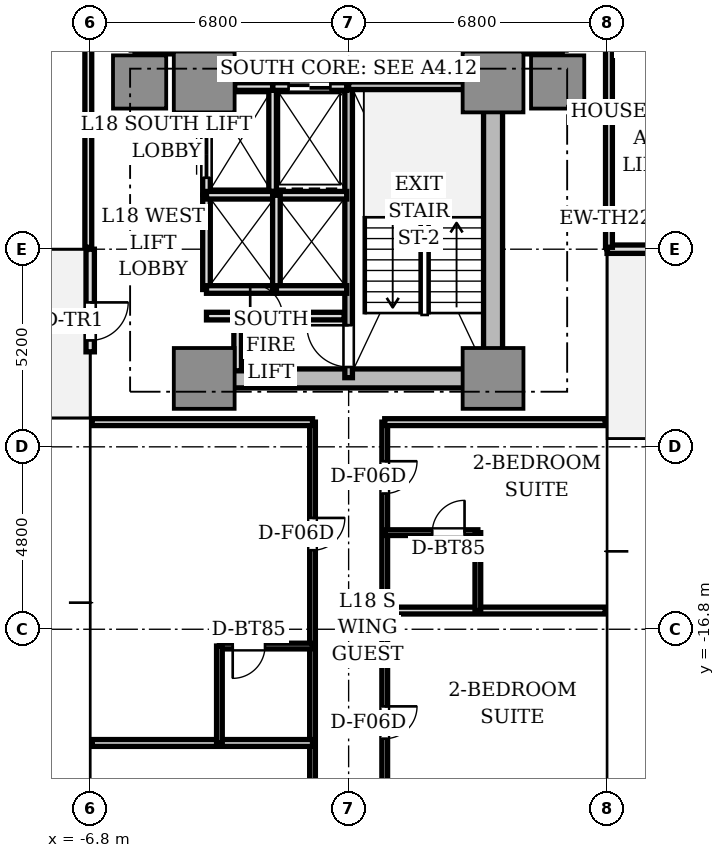
"""IFC4 building model, lengths in metres.
Left out: names, types, materials, properties, quantities, classifications, styles, units other than length and angle.
Written with IfcOpenShell. Run it as: python <this file> out.ifc"""

import sys

from ifc_helpers import new_model, si_unit, direction, frame, frame_2d, origin, origin_2d, place, context, subcontext, project, spatial, rectangle, extrude, source, transform, mapped, element, fill, save


model = new_model("IFC4")
c1 = context("Model", 3, precision=1e-05, world=origin(), true_north=direction((0.0, 1.0)))
c2 = subcontext(c1, "Body", "Model", "MODEL_VIEW")
j1 = project(units=[si_unit("LENGTHUNIT", "METRE"), si_unit("PLANEANGLEUNIT", "RADIAN")], contexts=[c1])
p1 = place(None, origin())
s1 = spatial("IfcSite", under=j1, at=p1, CompositionType="ELEMENT")
p2 = place(p1, origin())
s2 = spatial("IfcBuilding", under=s1, at=p2, CompositionType="ELEMENT")
p3 = place(p2, frame((0.0, 0.0, 67.8)))
s3 = spatial("IfcBuildingStorey", under=s2, at=p3, CompositionType="ELEMENT", Elevation=67.8)
p4 = place(p3, frame((-3.55, -10.2, 0.0), z_axis=(0.0, 0.0, 1.0), x_axis=(1.0, 0.0, 0.0)))
e1 = element("IfcWall", 1, at=p4, inside=s3, PredefinedType="SHEAR", context=c2, shape_type="SweptSolid", body=[
    extrude(rectangle(XDim=7.1, YDim=0.5, at=frame_2d((3.55, 0.0))), origin(), (0.0, 0.0, 1.0), 3.11),
])
p5 = place(p3, frame((3.8, -9.75, 0.0), z_axis=(0.0, 0.0, 1.0), x_axis=(0.0, 1.0, 0.0)))
e2 = element("IfcWall", 2, at=p5, inside=s3, PredefinedType="SHEAR", context=c2, shape_type="SweptSolid", body=[
    extrude(rectangle(XDim=6.9, YDim=0.5, at=frame_2d((3.45, 0.0))), origin(), (0.0, 0.0, 1.0), 3.11),
])
m1 = source(origin(), c2, "Body", "SweptSolid", [
    extrude(rectangle(XDim=1.6, YDim=1.6, at=origin_2d()), origin(), (0.0, 0.0, 1.0), 3.11),
])
for number, where, z_axis, x_axis in (
    (3, (-3.8, -2.4, 0.0), (0.0, 0.0, 1.0), (1.0, 0.0, 0.0)),
    (4, (3.8, -2.4, 0.0), (0.0, 0.0, 1.0), (1.0, 0.0, 0.0)),
    (5, (-3.8, -10.2, 0.0), (0.0, 0.0, 1.0), (1.0, 0.0, 0.0)),
    (6, (3.8, -10.2, 0.0), (0.0, 0.0, 1.0), (1.0, 0.0, 0.0)),
):
    element("IfcColumn", number, at=place(p3, frame(where, z_axis=z_axis, x_axis=x_axis)), inside=s3, PredefinedType="COLUMN", context=c2, shape_type="MappedRepresentation", body=[
        mapped(m1, transform((0.0, 0.0, 0.0), scale=1.0)),
    ])
m2 = source(origin(), c2, "Body", "SweptSolid", [
    extrude(rectangle(XDim=1.4, YDim=1.4, at=origin_2d()), origin(), (0.0, 0.0, 1.0), 3.11),
])
for number, where, z_axis, x_axis in (
    (7, (5.5, -2.4, 0.0), (0.0, 0.0, 1.0), (1.0, 0.0, 0.0)),
    (8, (-5.5, -2.4, 0.0), (0.0, 0.0, 1.0), (1.0, 0.0, 0.0)),
):
    element("IfcColumn", number, at=place(p3, frame(where, z_axis=z_axis, x_axis=x_axis)), inside=s3, PredefinedType="COLUMN", context=c2, shape_type="MappedRepresentation", body=[
        mapped(m2, transform((0.0, 0.0, 0.0), scale=1.0)),
    ])
p6 = place(p3, frame((6.8, -6.8, 0.0), z_axis=(0.0, 0.0, 1.0), x_axis=(1.0, 0.0, 0.0)))
e9 = element("IfcWall", 9, at=p6, inside=s3, PredefinedType="STANDARD", context=c2, shape_type="SweptSolid", body=[
    extrude(rectangle(XDim=2.7, YDim=0.22, at=frame_2d((1.35, 0.0))), origin(), (0.0, 0.0, 1.0), 3.11),
])
p7 = place(p6, frame((1.4, 0.0, 0.0)))
e10 = element("IfcOpeningElement", 10, at=p7, cuts=e9, PredefinedType="OPENING", context=c2, shape_type="SweptSolid", body=[
    extrude(rectangle(XDim=1.0, YDim=2.2, at=frame_2d((0.5, 1.1))), frame((0.0, 0.12, 0.0), z_axis=(0.0, -1.0, 0.0), x_axis=(1.0, 0.0, 0.0)), (0.0, 0.0, 1.0), 0.24),
])
p8 = place(p3, frame((-6.8, -6.8, 0.0), z_axis=(0.0, 0.0, 1.0), x_axis=(0.0, -1.0, 0.0)))
e11 = element("IfcWall", 11, at=p8, inside=s3, PredefinedType="STANDARD", context=c2, shape_type="SweptSolid", body=[
    extrude(rectangle(XDim=2.7, YDim=0.22, at=frame_2d((1.35, 0.0))), origin(), (0.0, 0.0, 1.0), 3.11),
])
p9 = place(p8, frame((1.4, 0.0, 0.0)))
e12 = element("IfcOpeningElement", 12, at=p9, cuts=e11, PredefinedType="OPENING", context=c2, shape_type="SweptSolid", body=[
    extrude(rectangle(XDim=1.0, YDim=2.2, at=frame_2d((0.5, 1.1))), frame((0.0, 0.12, 0.0), z_axis=(0.0, -1.0, 0.0), x_axis=(1.0, 0.0, 0.0)), (0.0, 0.0, 1.0), 0.24),
])
p10 = place(p3, frame((0.0, -10.18, 0.0), z_axis=(0.0, 0.0, 1.0), x_axis=(0.0, 1.0, 0.0)))
e13 = element("IfcWall", 13, at=p10, inside=s3, PredefinedType="SOLIDWALL", context=c2, shape_type="SweptSolid", body=[
    extrude(rectangle(XDim=7.68, YDim=0.2, at=frame_2d((3.84, 0.0))), origin(), (0.0, 0.0, 1.0), 3.11),
])
p11 = place(p10, frame((0.28, 0.0, 0.0)))
e14 = element("IfcOpeningElement", 14, at=p11, cuts=e13, PredefinedType="OPENING", context=c2, shape_type="SweptSolid", body=[
    extrude(rectangle(XDim=1.1, YDim=2.15, at=frame_2d((0.55, 1.075))), frame((0.0, 0.11, 0.0), z_axis=(0.0, -1.0, 0.0), x_axis=(1.0, 0.0, 0.0)), (0.0, 0.0, 1.0), 0.22),
])
p12 = place(p3, frame((0.0, -2.5, 0.0), z_axis=(0.0, 0.0, 1.0), x_axis=(1.0, 0.0, 0.0)))
e15 = element("IfcWall", 15, at=p12, inside=s3, PredefinedType="SOLIDWALL", context=c2, shape_type="SweptSolid", body=[
    extrude(rectangle(XDim=3.72, YDim=0.2, at=frame_2d((1.86, 0.0))), origin(), (0.0, 0.0, 1.0), 3.11),
])
p13 = place(p3, frame((-2.0, -5.28, 0.0), z_axis=(0.0, 0.0, 1.0), x_axis=(0.0, 1.0, 0.0)))
e16 = element("IfcWall", 16, at=p13, inside=s3, PredefinedType="SOLIDWALL", context=c2, shape_type="SweptSolid", body=[
    extrude(rectangle(XDim=2.78, YDim=0.2, at=frame_2d((1.39, 0.0))), origin(), (0.0, 0.0, 1.0), 2.66),
])
p14 = place(p3, frame((-2.0, -2.52, 0.0), z_axis=(0.0, 0.0, 1.0), x_axis=(1.0, 0.0, 0.0)))
e17 = element("IfcWall", 17, at=p14, inside=s3, PredefinedType="SOLIDWALL", context=c2, shape_type="SweptSolid", body=[
    extrude(rectangle(XDim=1.95, YDim=0.2, at=frame_2d((0.975, 0.0))), origin(), (0.0, 0.0, 1.0), 2.66),
])
p15 = place(p14, frame((0.42, 0.0, 0.0)))
e18 = element("IfcOpeningElement", 18, at=p15, cuts=e17, PredefinedType="OPENING", context=c2, shape_type="SweptSolid", body=[
    extrude(rectangle(XDim=1.1, YDim=2.2, at=frame_2d((0.55, 1.1))), frame((0.0, 0.11, 0.0), z_axis=(0.0, -1.0, 0.0), x_axis=(1.0, 0.0, 0.0)), (0.0, 0.0, 1.0), 0.22),
])
p16 = place(p3, frame((-3.0, -2.52, 0.0), z_axis=(0.0, 0.0, 1.0), x_axis=(1.0, 0.0, 0.0)))
e19 = element("IfcWall", 19, at=p16, inside=s3, PredefinedType="SOLIDWALL", context=c2, shape_type="SweptSolid", body=[
    extrude(rectangle(XDim=1.0, YDim=0.2, at=frame_2d((0.5, 0.0))), origin(), (0.0, 0.0, 1.0), 2.66),
])
p17 = place(p3, frame((-3.74, -5.36, 0.0), z_axis=(0.0, 0.0, 1.0), x_axis=(0.0, 1.0, 0.0)))
e20 = element("IfcWall", 20, at=p17, inside=s3, PredefinedType="SOLIDWALL", context=c2, shape_type="SweptSolid", body=[
    extrude(rectangle(XDim=2.08, YDim=0.2, at=frame_2d((1.04, 0.0))), origin(), (0.0, 0.0, 1.0), 2.66),
])
p18 = place(p17, frame((0.44, 0.0, 0.0)))
e21 = element("IfcOpeningElement", 21, at=p18, cuts=e20, PredefinedType="OPENING", context=c2, shape_type="SweptSolid", body=[
    extrude(rectangle(XDim=1.2, YDim=2.2, at=frame_2d((0.6, 1.1))), frame((0.0, 0.11, 0.0), z_axis=(0.0, -1.0, 0.0), x_axis=(1.0, 0.0, 0.0)), (0.0, 0.0, 1.0), 0.22),
])
p19 = place(p3, frame((-3.74, -7.86, 0.0), z_axis=(0.0, 0.0, 1.0), x_axis=(0.0, 1.0, 0.0)))
e22 = element("IfcWall", 22, at=p19, inside=s3, PredefinedType="SOLIDWALL", context=c2, shape_type="SweptSolid", body=[
    extrude(rectangle(XDim=2.48, YDim=0.2, at=frame_2d((1.24, 0.0))), origin(), (0.0, 0.0, 1.0), 2.66),
])
p20 = place(p3, frame((-3.74, -7.86, 0.0), z_axis=(0.0, 0.0, 1.0), x_axis=(1.0, 0.0, 0.0)))
e23 = element("IfcWall", 23, at=p20, inside=s3, PredefinedType="SOLIDWALL", context=c2, shape_type="SweptSolid", body=[
    extrude(rectangle(XDim=1.84, YDim=0.2, at=frame_2d((0.92, 0.0))), origin(), (0.0, 0.0, 1.0), 2.66),
])
p21 = place(p3, frame((-3.74, -5.38, 0.0), z_axis=(0.0, 0.0, 1.0), x_axis=(1.0, 0.0, 0.0)))
e24 = element("IfcWall", 24, at=p21, inside=s3, PredefinedType="SOLIDWALL", context=c2, shape_type="SweptSolid", body=[
    extrude(rectangle(XDim=3.69, YDim=0.2, at=frame_2d((1.845, 0.0))), origin(), (0.0, 0.0, 1.0), 2.66),
])
p22 = place(p3, frame((-1.9, -7.86, 0.0), z_axis=(0.0, 0.0, 1.0), x_axis=(0.0, 1.0, 0.0)))
e25 = element("IfcWall", 25, at=p22, inside=s3, PredefinedType="SOLIDWALL", context=c2, shape_type="SweptSolid", body=[
    extrude(rectangle(XDim=2.48, YDim=0.2, at=frame_2d((1.24, 0.0))), origin(), (0.0, 0.0, 1.0), 2.66),
])
p23 = place(p3, frame((-1.9, -7.86, 0.0), z_axis=(0.0, 0.0, 1.0), x_axis=(1.0, 0.0, 0.0)))
e26 = element("IfcWall", 26, at=p23, inside=s3, PredefinedType="SOLIDWALL", context=c2, shape_type="SweptSolid", body=[
    extrude(rectangle(XDim=1.85, YDim=0.2, at=frame_2d((0.925, 0.0))), origin(), (0.0, 0.0, 1.0), 2.66),
])
for number, where, z_axis, x_axis in (
    (27, (3.98, -1.56, 0.0), (0.0, 0.0, 1.0), (1.0, 0.0, 0.0)),
    (28, (-5.62, -1.56, 0.0), (0.0, 0.0, 1.0), (1.0, 0.0, 0.0)),
):
    element("IfcWall", number, at=place(p3, frame(where, z_axis=z_axis, x_axis=x_axis)), inside=s3, PredefinedType="SOLIDWALL", context=c2, shape_type="SweptSolid", body=[
        extrude(rectangle(XDim=1.64, YDim=0.2, at=frame_2d((0.82, 0.0))), origin(), (0.0, 0.0, 1.0), 2.66),
    ])
p24 = place(p3, frame((-3.74, -8.56, 0.0), z_axis=(0.0, 0.0, 1.0), x_axis=(1.0, 0.0, 0.0)))
e29 = element("IfcWall", 29, at=p24, inside=s3, PredefinedType="SOLIDWALL", context=c2, shape_type="SweptSolid", body=[
    extrude(rectangle(XDim=3.62, YDim=0.2, at=frame_2d((1.81, 0.0))), origin(), (0.0, 0.0, 1.0), 2.66),
])
p25 = place(p24, frame((1.15, 0.0, 0.0)))
e30 = element("IfcOpeningElement", 30, at=p25, cuts=e29, PredefinedType="OPENING", context=c2, shape_type="SweptSolid", body=[
    extrude(rectangle(XDim=0.85, YDim=2.1, at=frame_2d((0.425, 1.05))), frame((0.0, 0.11, 0.0), z_axis=(0.0, -1.0, 0.0), x_axis=(1.0, 0.0, 0.0)), (0.0, 0.0, 1.0), 0.22),
])
p26 = place(p3, frame((-2.92, -10.0, 0.0), z_axis=(0.0, 0.0, 1.0), x_axis=(0.0, 1.0, 0.0)))
e31 = element("IfcWall", 31, at=p26, inside=s3, PredefinedType="SOLIDWALL", context=c2, shape_type="SweptSolid", body=[
    extrude(rectangle(XDim=1.44, YDim=0.2, at=frame_2d((0.72, 0.0))), origin(), (0.0, 0.0, 1.0), 2.66),
])
p27 = place(p3, frame((6.85, -6.75, 0.0), z_axis=(0.0, 0.0, 1.0), x_axis=(0.0, 1.0, 0.0)))
e32 = element("IfcWall", 32, at=p27, inside=s3, PredefinedType="PARTITIONING", context=c2, shape_type="SweptSolid", body=[
    extrude(rectangle(XDim=5.75, YDim=0.18, at=frame_2d((2.875, 0.0))), origin(), (0.0, 0.0, 1.0), 2.66),
])
p28 = place(p3, frame((-6.85, -0.95, 0.0), z_axis=(0.0, 0.0, 1.0), x_axis=(0.0, -1.0, 0.0)))
e33 = element("IfcWall", 33, at=p28, inside=s3, PredefinedType="PARTITIONING", context=c2, shape_type="SweptSolid", body=[
    extrude(rectangle(XDim=5.8, YDim=0.18, at=frame_2d((2.9, 0.0))), origin(), (0.0, 0.0, 1.0), 2.66),
])
p29 = place(p3, frame((0.95, -11.35, 0.0), z_axis=(0.0, 0.0, 1.0), x_axis=(0.0, -1.0, 0.0)))
e34 = element("IfcWall", 34, at=p29, inside=s3, PredefinedType="PARTITIONING", context=c2, shape_type="SweptSolid", body=[
    extrude(rectangle(XDim=13.4, YDim=0.15, at=frame_2d((6.7, 0.0))), origin(), (0.0, 0.0, 1.0), 2.66),
])
p30 = place(p29, frame((1.029, 0.0, 0.0)))
e35 = element("IfcOpeningElement", 35, at=p30, cuts=e34, PredefinedType="OPENING", context=c2, shape_type="SweptSolid", body=[
    extrude(rectangle(XDim=0.85, YDim=2.1, at=frame_2d((0.425, 1.05))), frame((0.0, 0.085, 0.0), z_axis=(0.0, -1.0, 0.0), x_axis=(1.0, 0.0, 0.0)), (0.0, 0.0, 1.0), 0.17),
])
p31 = place(p29, frame((7.479, 0.0, 0.0)))
e36 = element("IfcOpeningElement", 36, at=p31, cuts=e34, PredefinedType="OPENING", context=c2, shape_type="SweptSolid", body=[
    extrude(rectangle(XDim=0.85, YDim=2.1, at=frame_2d((0.425, 1.05))), frame((0.0, 0.085, 0.0), z_axis=(0.0, -1.0, 0.0), x_axis=(1.0, 0.0, 0.0)), (0.0, 0.0, 1.0), 0.17),
])
p32 = place(p3, frame((-0.95, -11.35, 0.0), z_axis=(0.0, 0.0, 1.0), x_axis=(0.0, -1.0, 0.0)))
e37 = element("IfcWall", 37, at=p32, inside=s3, PredefinedType="PARTITIONING", context=c2, shape_type="SweptSolid", body=[
    extrude(rectangle(XDim=13.4, YDim=0.15, at=frame_2d((6.7, 0.0))), origin(), (0.0, 0.0, 1.0), 2.66),
])
p33 = place(p32, frame((2.521, 0.0, 0.0)))
e38 = element("IfcOpeningElement", 38, at=p33, cuts=e37, PredefinedType="OPENING", context=c2, shape_type="SweptSolid", body=[
    extrude(rectangle(XDim=0.85, YDim=2.1, at=frame_2d((0.425, 1.05))), frame((0.0, 0.085, 0.0), z_axis=(0.0, -1.0, 0.0), x_axis=(1.0, 0.0, 0.0)), (0.0, 0.0, 1.0), 0.17),
])
p34 = place(p32, frame((9.471, 0.0, 0.0)))
e39 = element("IfcOpeningElement", 39, at=p34, cuts=e37, PredefinedType="OPENING", context=c2, shape_type="SweptSolid", body=[
    extrude(rectangle(XDim=0.85, YDim=2.1, at=frame_2d((0.425, 1.05))), frame((0.0, 0.085, 0.0), z_axis=(0.0, -1.0, 0.0), x_axis=(1.0, 0.0, 0.0)), (0.0, 0.0, 1.0), 0.17),
])
for number, where, z_axis, x_axis in (
    (40, (0.95, -11.35, 0.0), (0.0, 0.0, 1.0), (1.0, 0.0, 0.0)),
    (41, (-6.75, -11.35, 0.0), (0.0, 0.0, 1.0), (1.0, 0.0, 0.0)),
    (42, (0.95, -16.308, 0.0), (0.0, 0.0, 1.0), (1.0, 0.0, 0.0)),
):
    element("IfcWall", number, at=place(p3, frame(where, z_axis=z_axis, x_axis=x_axis)), inside=s3, PredefinedType="PARTITIONING", context=c2, shape_type="SweptSolid", body=[
        extrude(rectangle(XDim=5.8, YDim=0.18, at=frame_2d((2.9, 0.0))), origin(), (0.0, 0.0, 1.0), 2.66),
    ])
p35 = place(p3, frame((0.95, -14.258, 0.0), z_axis=(0.0, 0.0, 1.0), x_axis=(1.0, 0.0, 0.0)))
e43 = element("IfcWall", 43, at=p35, inside=s3, PredefinedType="PARTITIONING", context=c2, shape_type="SweptSolid", body=[
    extrude(rectangle(XDim=2.45, YDim=0.15, at=frame_2d((1.225, 0.0))), origin(), (0.0, 0.0, 1.0), 2.66),
])
p36 = place(p35, frame((1.25, 0.0, 0.0)))
e44 = element("IfcOpeningElement", 44, at=p36, cuts=e43, PredefinedType="OPENING", context=c2, shape_type="SweptSolid", body=[
    extrude(rectangle(XDim=0.85, YDim=2.1, at=frame_2d((0.425, 1.05))), frame((0.0, 0.085, 0.0), z_axis=(0.0, -1.0, 0.0), x_axis=(1.0, 0.0, 0.0)), (0.0, 0.0, 1.0), 0.17),
])
p37 = place(p3, frame((3.4, -14.258, 0.0), z_axis=(0.0, 0.0, 1.0), x_axis=(0.0, -1.0, 0.0)))
e45 = element("IfcWall", 45, at=p37, inside=s3, PredefinedType="PARTITIONING", context=c2, shape_type="SweptSolid", body=[
    extrude(rectangle(XDim=2.05, YDim=0.15, at=frame_2d((1.025, 0.0))), origin(), (0.0, 0.0, 1.0), 2.66),
])
p38 = place(p3, frame((-0.95, -19.792, 0.0), z_axis=(0.0, 0.0, 1.0), x_axis=(-1.0, 0.0, 0.0)))
e46 = element("IfcWall", 46, at=p38, inside=s3, PredefinedType="PARTITIONING", context=c2, shape_type="SweptSolid", body=[
    extrude(rectangle(XDim=5.8, YDim=0.18, at=frame_2d((2.9, 0.0))), origin(), (0.0, 0.0, 1.0), 2.66),
])
p39 = place(p3, frame((-0.95, -17.242, 0.0), z_axis=(0.0, 0.0, 1.0), x_axis=(-1.0, 0.0, 0.0)))
e47 = element("IfcWall", 47, at=p39, inside=s3, PredefinedType="PARTITIONING", context=c2, shape_type="SweptSolid", body=[
    extrude(rectangle(XDim=2.45, YDim=0.15, at=frame_2d((1.225, 0.0))), origin(), (0.0, 0.0, 1.0), 2.66),
])
p40 = place(p39, frame((1.25, 0.0, 0.0)))
e48 = element("IfcOpeningElement", 48, at=p40, cuts=e47, PredefinedType="OPENING", context=c2, shape_type="SweptSolid", body=[
    extrude(rectangle(XDim=0.85, YDim=2.1, at=frame_2d((0.425, 1.05))), frame((0.0, 0.085, 0.0), z_axis=(0.0, -1.0, 0.0), x_axis=(1.0, 0.0, 0.0)), (0.0, 0.0, 1.0), 0.17),
])
p41 = place(p3, frame((-3.4, -17.242, 0.0), z_axis=(0.0, 0.0, 1.0), x_axis=(0.0, -1.0, 0.0)))
e49 = element("IfcWall", 49, at=p41, inside=s3, PredefinedType="PARTITIONING", context=c2, shape_type="SweptSolid", body=[
    extrude(rectangle(XDim=2.55, YDim=0.15, at=frame_2d((1.275, 0.0))), origin(), (0.0, 0.0, 1.0), 2.66),
])
m3 = source(origin(), c2, "Body", "SweptSolid", [
    extrude(rectangle(XDim=1.0, YDim=0.05, at=origin_2d()), origin(), (0.0, 0.0, 1.0), 2.2),
])
p42 = place(p9, frame((0.5, 0.0, 0.0)))
e50 = element("IfcDoor", 50, at=p42, inside=s3, OperationType="SINGLE_SWING_LEFT", PredefinedType="DOOR", context=c2, shape_type="MappedRepresentation", body=[
    mapped(m3, transform((0.0, 0.0, 0.0), scale=1.0)),
])
fill(e12, e50)
m4 = source(origin(), c2, "Body", "SweptSolid", [
    extrude(rectangle(XDim=1.1, YDim=0.05, at=origin_2d()), origin(), (0.0, 0.0, 1.0), 2.2),
])
p43 = place(p15, frame((0.55, 0.0, 0.0)))
e51 = element("IfcDoor", 51, at=p43, inside=s3, OperationType="DOUBLE_DOOR_SLIDING", PredefinedType="DOOR", context=c2, shape_type="MappedRepresentation", body=[
    mapped(m4, transform((0.0, 0.0, 0.0), scale=1.0)),
])
fill(e18, e51)
m5 = source(origin(), c2, "Body", "SweptSolid", [
    extrude(rectangle(XDim=1.2, YDim=0.05, at=origin_2d()), origin(), (0.0, 0.0, 1.0), 2.2),
])
p44 = place(p18, frame((0.6, 0.0, 0.0)))
e52 = element("IfcDoor", 52, at=p44, inside=s3, OperationType="DOUBLE_DOOR_SLIDING", PredefinedType="DOOR", context=c2, shape_type="MappedRepresentation", body=[
    mapped(m5, transform((0.0, 0.0, 0.0), scale=1.0)),
])
fill(e21, e52)
m6 = source(origin(), c2, "Body", "SweptSolid", [
    extrude(rectangle(XDim=1.1, YDim=0.05, at=origin_2d()), origin(), (0.0, 0.0, 1.0), 2.15),
])
p45 = place(p11, frame((0.55, 0.0, 0.0)))
e53 = element("IfcDoor", 53, at=p45, inside=s3, OperationType="SINGLE_SWING_RIGHT", PredefinedType="DOOR", context=c2, shape_type="MappedRepresentation", body=[
    mapped(m6, transform((0.0, 0.0, 0.0), scale=1.0)),
])
fill(e14, e53)
m7 = source(origin(), c2, "Body", "SweptSolid", [
    extrude(rectangle(XDim=0.85, YDim=0.05, at=origin_2d()), origin(), (0.0, 0.0, 1.0), 2.1),
])
p46 = place(p25, frame((0.425, 0.0, 0.0)))
e54 = element("IfcDoor", 54, at=p46, inside=s3, OperationType="SINGLE_SWING_LEFT", PredefinedType="DOOR", context=c2, shape_type="MappedRepresentation", body=[
    mapped(m7, transform((0.0, 0.0, 0.0), scale=1.0)),
])
fill(e30, e54)
p47 = place(p36, frame((0.425, 0.0, 0.0)))
e55 = element("IfcDoor", 55, at=p47, inside=s3, OperationType="SINGLE_SWING_RIGHT", PredefinedType="DOOR", context=c2, shape_type="MappedRepresentation", body=[
    mapped(m7, transform((0.0, 0.0, 0.0), scale=1.0)),
])
fill(e44, e55)
p48 = place(p30, frame((0.425, 0.0, 0.0)))
e56 = element("IfcDoor", 56, at=p48, inside=s3, OperationType="SINGLE_SWING_LEFT", PredefinedType="DOOR", context=c2, shape_type="MappedRepresentation", body=[
    mapped(m7, transform((0.0, 0.0, 0.0), scale=1.0)),
])
fill(e35, e56)
p49 = place(p31, frame((0.425, 0.0, 0.0)))
e57 = element("IfcDoor", 57, at=p49, inside=s3, OperationType="SINGLE_SWING_LEFT", PredefinedType="DOOR", context=c2, shape_type="MappedRepresentation", body=[
    mapped(m7, transform((0.0, 0.0, 0.0), scale=1.0)),
])
fill(e36, e57)
p50 = place(p40, frame((0.425, 0.0, 0.0)))
e58 = element("IfcDoor", 58, at=p50, inside=s3, OperationType="SINGLE_SWING_RIGHT", PredefinedType="DOOR", context=c2, shape_type="MappedRepresentation", body=[
    mapped(m7, transform((0.0, 0.0, 0.0), scale=1.0)),
])
fill(e48, e58)
p51 = place(p33, frame((0.425, 0.0, 0.0)))
e59 = element("IfcDoor", 59, at=p51, inside=s3, OperationType="SINGLE_SWING_LEFT", PredefinedType="DOOR", context=c2, shape_type="MappedRepresentation", body=[
    mapped(m7, transform((0.0, 0.0, 0.0), scale=1.0)),
])
fill(e38, e59)
save(model, sys.argv[1])
